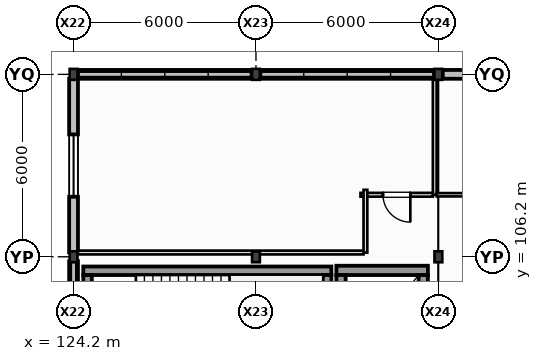
"""IFC4 building model, lengths in metres.
Left out: names, types, materials, properties, quantities, classifications, styles, units other than length and angle.
Written with IfcOpenShell. Run it as: python <this file> out.ifc"""

import sys

from ifc_helpers import new_model, si_unit, direction, frame, frame_2d, origin, origin_2d, place, context, subcontext, project, spatial, rectangle, i_section, extrude, element, fill, save


model = new_model("IFC4")
c1 = context("Model", 3, precision=1e-05, world=origin(), true_north=direction((0.0, 1.0)))
c2 = subcontext(c1, "Body", "Model", "MODEL_VIEW")
j1 = project(units=[si_unit("LENGTHUNIT", "METRE"), si_unit("PLANEANGLEUNIT", "RADIAN")], contexts=[c1])
p1 = place(None, origin())
s1 = spatial("IfcSite", under=j1, at=p1, CompositionType="ELEMENT")
p2 = place(p1, origin())
s2 = spatial("IfcBuilding", under=s1, at=p2, CompositionType="ELEMENT")
p3 = place(p2, frame((0.0, 0.0, 18.0)))
s3 = spatial("IfcBuildingStorey", under=s2, at=p3, CompositionType="ELEMENT", Elevation=18.0)
for number, where, z_axis, x_axis in (
    (1, (124.2, 106.2, 0.0), (0.0, 0.0, 1.0), (1.0, 0.0, 0.0)),
    (2, (124.2, 112.2, 0.0), (0.0, 0.0, 1.0), (1.0, 0.0, 0.0)),
    (3, (130.2, 106.2, 0.0), (0.0, 0.0, 1.0), (1.0, 0.0, 0.0)),
    (4, (130.2, 112.2, 0.0), (0.0, 0.0, 1.0), (1.0, 0.0, 0.0)),
    (5, (136.2, 106.2, 0.0), (0.0, 0.0, 1.0), (1.0, 0.0, 0.0)),
    (6, (136.2, 112.2, 0.0), (0.0, 0.0, 1.0), (1.0, 0.0, 0.0)),
):
    element("IfcColumn", number, at=place(p3, frame(where, z_axis=z_axis, x_axis=x_axis)), inside=s3, PredefinedType="COLUMN", context=c2, shape_type="SweptSolid", body=[
        extrude(i_section(OverallWidth=0.256, OverallDepth=0.36, WebThickness=0.011, FlangeThickness=0.02, at=origin_2d()), origin(), (0.0, 0.0, 1.0), 3.6),
    ])
p4 = place(p3, frame((130.055, 112.2, 0.0), z_axis=(0.0, 0.0, 1.0), x_axis=(-1.0, 0.0, 0.0)))
e7 = element("IfcWall", 7, at=p4, inside=s3, PredefinedType="STANDARD", context=c2, shape_type="SweptSolid", body=[
    extrude(rectangle(XDim=5.71, YDim=0.29, at=frame_2d((2.855, 0.0))), origin(), (0.0, 0.0, 1.0), 0.44),
])
p5 = place(p3, frame((136.055, 112.2, 0.0), z_axis=(0.0, 0.0, 1.0), x_axis=(-1.0, 0.0, 0.0)))
e8 = element("IfcWall", 8, at=p5, inside=s3, PredefinedType="STANDARD", context=c2, shape_type="SweptSolid", body=[
    extrude(rectangle(XDim=5.71, YDim=0.29, at=frame_2d((2.855, 0.0))), origin(), (0.0, 0.0, 1.0), 0.56),
])
p6 = place(p3, frame((142.055, 112.2, 0.0), z_axis=(0.0, 0.0, 1.0), x_axis=(-1.0, 0.0, 0.0)))
e9 = element("IfcWall", 9, at=p6, inside=s3, PredefinedType="STANDARD", context=c2, shape_type="SweptSolid", body=[
    extrude(rectangle(XDim=5.71, YDim=0.29, at=frame_2d((2.855, 0.0))), origin(), (0.0, 0.0, 1.0), 3.6),
])
p7 = place(p6, frame((1.98, 0.0, 0.85)))
e10 = element("IfcOpeningElement", 10, at=p7, cuts=e9, PredefinedType="OPENING", context=c2, shape_type="SweptSolid", body=[
    extrude(rectangle(XDim=1.75, YDim=1.75, at=frame_2d((0.875, 0.875))), frame((0.0, 0.155, 0.0), z_axis=(0.0, -1.0, 0.0), x_axis=(1.0, 0.0, 0.0)), (0.0, 0.0, 1.0), 0.31),
])
p8 = place(p3, frame((124.2, 106.055, 0.0), z_axis=(0.0, 0.0, 1.0), x_axis=(0.0, -1.0, 0.0)))
e11 = element("IfcWall", 11, at=p8, inside=s3, PredefinedType="STANDARD", context=c2, shape_type="SweptSolid", body=[
    extrude(rectangle(XDim=5.71, YDim=0.29, at=frame_2d((2.855, 0.0))), origin(), (0.0, 0.0, 1.0), 0.32),
])
p9 = place(p3, frame((124.2, 112.055, 0.0), z_axis=(0.0, 0.0, 1.0), x_axis=(0.0, -1.0, 0.0)))
e12 = element("IfcWall", 12, at=p9, inside=s3, PredefinedType="STANDARD", context=c2, shape_type="SweptSolid", body=[
    extrude(rectangle(XDim=5.71, YDim=0.29, at=frame_2d((2.855, 0.0))), origin(), (0.0, 0.0, 1.0), 3.6),
])
p10 = place(p9, frame((1.83, 0.0, 0.85)))
e13 = element("IfcOpeningElement", 13, at=p10, cuts=e12, PredefinedType="OPENING", context=c2, shape_type="SweptSolid", body=[
    extrude(rectangle(XDim=2.05, YDim=1.75, at=frame_2d((1.025, 0.875))), frame((0.0, 0.155, 0.0), z_axis=(0.0, -1.0, 0.0), x_axis=(1.0, 0.0, 0.0)), (0.0, 0.0, 1.0), 0.31),
])
p11 = place(p3, frame((132.68, 105.74, 0.0), z_axis=(0.0, 0.0, 1.0), x_axis=(-1.0, 0.0, 0.0)))
e14 = element("IfcWall", 14, at=p11, inside=s3, PredefinedType="SHEAR", context=c2, shape_type="SweptSolid", body=[
    extrude(rectangle(XDim=8.16, YDim=0.28, at=frame_2d((4.08, 0.0))), origin(), (0.0, 0.0, 1.0), 3.45),
])
for number, where, z_axis, x_axis in (
    (15, (124.66, 105.6, 0.0), (0.0, 0.0, 1.0), (0.0, -1.0, 0.0)),
    (16, (132.54, 102.6, 0.0), (0.0, 0.0, 1.0), (0.0, 1.0, 0.0)),
):
    element("IfcWall", number, at=place(p3, frame(where, z_axis=z_axis, x_axis=x_axis)), inside=s3, PredefinedType="SHEAR", context=c2, shape_type="SweptSolid", body=[
        extrude(rectangle(XDim=3.0, YDim=0.28, at=frame_2d((1.5, 0.0))), origin(), (0.0, 0.0, 1.0), 3.45),
    ])
p12 = place(p3, frame((135.855, 105.752, 0.0), z_axis=(0.0, 0.0, 1.0), x_axis=(-1.0, 0.0, 0.0)))
e17 = element("IfcWall", 17, at=p12, inside=s3, PredefinedType="SHEAR", context=c2, shape_type="SweptSolid", body=[
    extrude(rectangle(XDim=3.01, YDim=0.305, at=frame_2d((1.505, 0.0))), origin(), (0.0, 0.0, 1.0), 3.45),
])
for number, where, z_axis, x_axis in (
    (18, (132.998, 105.6, 0.0), (0.0, 0.0, 1.0), (0.0, -1.0, 0.0)),
    (19, (135.702, 102.6, 0.0), (0.0, 0.0, 1.0), (0.0, 1.0, 0.0)),
):
    element("IfcWall", number, at=place(p3, frame(where, z_axis=z_axis, x_axis=x_axis)), inside=s3, PredefinedType="SHEAR", context=c2, shape_type="SweptSolid", body=[
        extrude(rectangle(XDim=3.0, YDim=0.305, at=frame_2d((1.5, 0.0))), origin(), (0.0, 0.0, 1.0), 3.45),
    ])
p13 = place(p3, frame((136.08, 112.055, 0.0), z_axis=(0.0, 0.0, 1.0), x_axis=(0.0, -1.0, 0.0)))
e20 = element("IfcWall", 20, at=p13, inside=s3, PredefinedType="PARTITIONING", context=c2, shape_type="SweptSolid", body=[
    extrude(rectangle(XDim=3.817, YDim=0.125, at=frame_2d((1.909, 0.0))), origin(), (0.0, 0.0, 1.0), 3.36),
])
p14 = place(p3, frame((136.018, 108.24, 0.0), z_axis=(0.0, 0.0, 1.0), x_axis=(-1.0, 0.0, 0.0)))
e21 = element("IfcWall", 21, at=p14, inside=s3, PredefinedType="PARTITIONING", context=c2, shape_type="SweptSolid", body=[
    extrude(rectangle(XDim=2.38, YDim=0.125, at=frame_2d((1.19, 0.0))), origin(), (0.0, 0.0, 1.0), 3.36),
])
p15 = place(p14, frame((0.74, 0.0, 0.0)))
e22 = element("IfcOpeningElement", 22, at=p15, cuts=e21, PredefinedType="OPENING", context=c2, shape_type="SweptSolid", body=[
    extrude(rectangle(XDim=0.9, YDim=2.1, at=frame_2d((0.45, 1.05))), frame((0.0, 0.073, 0.0), z_axis=(0.0, -1.0, 0.0), x_axis=(1.0, 0.0, 0.0)), (0.0, 0.0, 1.0), 0.145),
])
p16 = place(p3, frame((133.8, 108.403, 0.0), z_axis=(0.0, 0.0, 1.0), x_axis=(0.0, -1.0, 0.0)))
e23 = element("IfcWall", 23, at=p16, inside=s3, PredefinedType="PARTITIONING", context=c2, shape_type="SweptSolid", body=[
    extrude(rectangle(XDim=2.065, YDim=0.125, at=frame_2d((1.033, 0.0))), origin(), (0.0, 0.0, 1.0), 3.36),
])
p17 = place(p3, frame((133.738, 106.34, 0.0), z_axis=(0.0, 0.0, 1.0), x_axis=(-1.0, 0.0, 0.0)))
e24 = element("IfcWall", 24, at=p17, inside=s3, PredefinedType="PARTITIONING", context=c2, shape_type="SweptSolid", body=[
    extrude(rectangle(XDim=9.393, YDim=0.125, at=frame_2d((4.696, 0.0))), origin(), (0.0, 0.0, 1.0), 3.36),
])
p18 = place(p3, frame((142.225, 108.24, 0.0), z_axis=(0.0, 0.0, 1.0), x_axis=(-1.0, 0.0, 0.0)))
e25 = element("IfcWall", 25, at=p18, inside=s3, PredefinedType="PARTITIONING", context=c2, shape_type="SweptSolid", body=[
    extrude(rectangle(XDim=6.083, YDim=0.11, at=frame_2d((3.041, 0.0))), origin(), (0.0, 0.0, 1.0), 3.36),
])
p19 = place(p18, frame((2.591, 0.0, 0.0)))
e26 = element("IfcOpeningElement", 26, at=p19, cuts=e25, PredefinedType="OPENING", context=c2, shape_type="SweptSolid", body=[
    extrude(rectangle(XDim=0.9, YDim=2.1, at=frame_2d((0.45, 1.05))), frame((0.0, 0.065, 0.0), z_axis=(0.0, -1.0, 0.0), x_axis=(1.0, 0.0, 0.0)), (0.0, 0.0, 1.0), 0.13),
])
p20 = place(p10, origin())
e27 = element("IfcWindow", 27, at=p20, inside=s3, PartitioningType="SINGLE_PANEL", PredefinedType="WINDOW", context=c2, shape_type="SweptSolid", body=[
    extrude(rectangle(XDim=2.05, YDim=1.75, at=frame_2d((1.025, 0.875))), frame((0.0, 0.03, 0.0), z_axis=(0.0, -1.0, 0.0), x_axis=(1.0, 0.0, 0.0)), (0.0, 0.0, 1.0), 0.06),
])
fill(e13, e27)
p21 = place(p2, frame((0.0, 0.0, 25.2)))
p22 = place(p21, frame((0.0, 0.0, -4.02)))
p23 = place(p22, frame((127.2, 107.6, -0.01)))
p24 = place(p23, frame((0.0, 0.0, 0.37)))
e28 = element("IfcWindow", 28, at=p24, inside=s3, PartitioningType="SINGLE_PANEL", PredefinedType="SKYLIGHT", context=c2, shape_type="SweptSolid", body=[
    extrude(rectangle(XDim=1.15, YDim=1.15, at=origin_2d()), origin(), (0.0, 0.0, 1.0), 0.06),
])
p25 = place(p22, frame((130.2, 107.6, -0.01)))
p26 = place(p25, frame((0.0, 0.0, 0.37)))
e29 = element("IfcWindow", 29, at=p26, inside=s3, PartitioningType="SINGLE_PANEL", PredefinedType="SKYLIGHT", context=c2, shape_type="SweptSolid", body=[
    extrude(rectangle(XDim=1.35, YDim=1.35, at=origin_2d()), origin(), (0.0, 0.0, 1.0), 0.06),
])
p27 = place(p22, frame((133.2, 107.6, -0.01)))
p28 = place(p27, frame((0.0, 0.0, 0.37)))
e30 = element("IfcWindow", 30, at=p28, inside=s3, PartitioningType="SINGLE_PANEL", PredefinedType="SKYLIGHT", context=c2, shape_type="SweptSolid", body=[
    extrude(rectangle(XDim=1.55, YDim=1.55, at=origin_2d()), origin(), (0.0, 0.0, 1.0), 0.06),
])
p29 = place(p22, frame((136.2, 107.6, -0.01)))
p30 = place(p29, frame((0.0, 0.0, 0.37)))
e31 = element("IfcWindow", 31, at=p30, inside=s3, PartitioningType="SINGLE_PANEL", PredefinedType="SKYLIGHT", context=c2, shape_type="SweptSolid", body=[
    extrude(rectangle(XDim=1.75, YDim=1.35, at=origin_2d()), origin(), (0.0, 0.0, 1.0), 0.06),
])
p31 = place(p15, frame((0.9, 0.0, 0.0), z_axis=(0.0, 0.0, 1.0), x_axis=(-1.0, 0.0, 0.0)))
e32 = element("IfcDoor", 32, at=p31, inside=s3, OperationType="SINGLE_SWING_LEFT", PredefinedType="DOOR", context=c2, shape_type="SweptSolid", body=[
    extrude(rectangle(XDim=0.9, YDim=2.1, at=frame_2d((0.45, 1.05))), frame((0.0, 0.025, 0.0), z_axis=(0.0, -1.0, 0.0), x_axis=(1.0, 0.0, 0.0)), (0.0, 0.0, 1.0), 0.05),
])
fill(e22, e32)
save(model, sys.argv[1])
